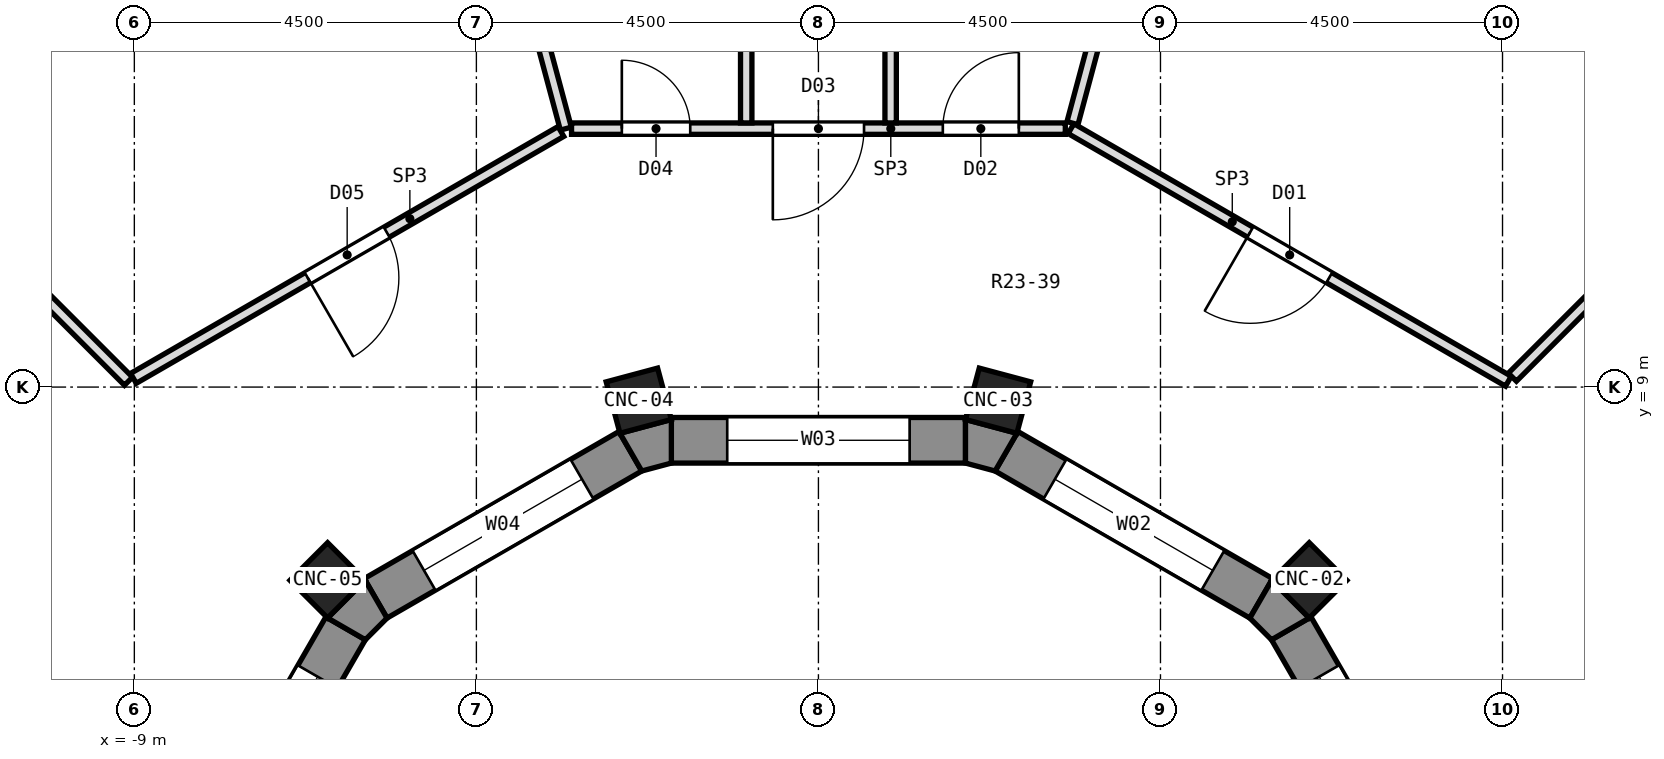
"""IFC4 building model, lengths in metres.
Left out: names, types, materials, properties, quantities, classifications, styles, units other than length and angle.
Written with IfcOpenShell. Run it as: python <this file> out.ifc"""

import sys

from ifc_helpers import new_model, si_unit, direction, frame, frame_2d, origin, origin_2d, place, context, subcontext, project, spatial, polyline, rectangle, outline, extrude, element, fill, save


model = new_model("IFC4")
c1 = context("Model", 3, precision=1e-05, world=origin(), true_north=direction((0.0, 1.0)))
c2 = subcontext(c1, "Body", "Model", "MODEL_VIEW")
j1 = project(units=[si_unit("LENGTHUNIT", "METRE"), si_unit("PLANEANGLEUNIT", "RADIAN")], contexts=[c1])
p1 = place(None, origin())
s1 = spatial("IfcSite", under=j1, at=p1, CompositionType="ELEMENT")
p2 = place(p1, origin())
s2 = spatial("IfcBuilding", under=s1, at=p2, CompositionType="ELEMENT")
p3 = place(p2, frame((0.0, 0.0, 151.3)))
s3 = spatial("IfcBuildingStorey", under=s2, at=p3, CompositionType="ELEMENT", Elevation=151.3)
for number, where, z_axis, x_axis in (
    (1, (6.458, 6.458, 0.0), (0.0, 0.0, 1.0), (0.707, 0.707, 0.0)),
    (2, (2.364, 8.821, 0.0), (0.0, 0.0, 1.0), (0.259, 0.966, 0.0)),
    (3, (-2.364, 8.821, 0.0), (0.0, 0.0, 1.0), (-0.259, 0.966, 0.0)),
    (4, (-6.458, 6.458, 0.0), (0.0, 0.0, 1.0), (-0.707, 0.707, 0.0)),
):
    element("IfcColumn", number, at=place(p3, frame(where, z_axis=z_axis, x_axis=x_axis)), inside=s3, PredefinedType="COLUMN", context=c2, shape_type="SweptSolid", body=[
        extrude(rectangle(XDim=0.7, YDim=0.7, at=origin_2d()), origin(), (0.0, 0.0, 1.0), 4.5),
    ])
p4 = place(p3, frame((8.156, 2.474, 0.0), z_axis=(0.0, 0.0, 1.0), x_axis=(-0.500033728941, 0.866005929495, 0.0)))
e5 = element("IfcWall", 5, at=p4, inside=s3, PredefinedType="SOLIDWALL", context=c2, shape_type="SweptSolid", body=[
    extrude(rectangle(XDim=3.87, YDim=0.6, at=frame_2d((1.935, 0.0))), origin(), (0.0, 0.0, 1.0), 3.95),
])
p5 = place(p4, frame((0.735, 0.0, 1.5)))
e6 = element("IfcOpeningElement", 6, at=p5, cuts=e5, PredefinedType="OPENING", context=c2, shape_type="SweptSolid", body=[
    extrude(rectangle(XDim=2.4, YDim=2.0, at=frame_2d((1.2, 1.0))), frame((0.0, 0.312, 0.0), z_axis=(0.0, -1.0, 0.0), x_axis=(1.0, 0.0, 0.0)), (0.0, 0.0, 1.0), 0.624),
])
p6 = place(p3, frame((5.826, 6.22, 0.0), z_axis=(0.0, 0.0, 1.0), x_axis=(-0.866005929495, 0.500033728941, 0.0)))
e7 = element("IfcWall", 7, at=p6, inside=s3, PredefinedType="SOLIDWALL", context=c2, shape_type="SweptSolid", body=[
    extrude(rectangle(XDim=3.87, YDim=0.6, at=frame_2d((1.935, 0.0))), origin(), (0.0, 0.0, 1.0), 3.95),
])
p7 = place(p6, frame((0.735, 0.0, 1.5)))
e8 = element("IfcOpeningElement", 8, at=p7, cuts=e7, PredefinedType="OPENING", context=c2, shape_type="SweptSolid", body=[
    extrude(rectangle(XDim=2.4, YDim=2.0, at=frame_2d((1.2, 1.0))), frame((0.0, 0.312, 0.0), z_axis=(0.0, -1.0, 0.0), x_axis=(1.0, 0.0, 0.0)), (0.0, 0.0, 1.0), 0.624),
])
p8 = place(p3, frame((1.935, 8.3, 0.0), z_axis=(0.0, 0.0, 1.0), x_axis=(-1.0, 0.0, 0.0)))
e9 = element("IfcWall", 9, at=p8, inside=s3, PredefinedType="SOLIDWALL", context=c2, shape_type="SweptSolid", body=[
    extrude(rectangle(XDim=3.87, YDim=0.6, at=frame_2d((1.935, 0.0))), origin(), (0.0, 0.0, 1.0), 3.95),
])
p9 = place(p8, frame((0.735, 0.0, 1.5)))
e10 = element("IfcOpeningElement", 10, at=p9, cuts=e9, PredefinedType="OPENING", context=c2, shape_type="SweptSolid", body=[
    extrude(rectangle(XDim=2.4, YDim=2.0, at=frame_2d((1.2, 1.0))), frame((0.0, 0.312, 0.0), z_axis=(0.0, -1.0, 0.0), x_axis=(1.0, 0.0, 0.0)), (0.0, 0.0, 1.0), 0.624),
])
p10 = place(p3, frame((-2.474, 8.156, 0.0), z_axis=(0.0, 0.0, 1.0), x_axis=(-0.866005929495, -0.500033728941, 0.0)))
e11 = element("IfcWall", 11, at=p10, inside=s3, PredefinedType="SOLIDWALL", context=c2, shape_type="SweptSolid", body=[
    extrude(rectangle(XDim=3.87, YDim=0.6, at=frame_2d((1.935, 0.0))), origin(), (0.0, 0.0, 1.0), 3.95),
])
p11 = place(p10, frame((0.735, 0.0, 1.5)))
e12 = element("IfcOpeningElement", 12, at=p11, cuts=e11, PredefinedType="OPENING", context=c2, shape_type="SweptSolid", body=[
    extrude(rectangle(XDim=2.4, YDim=2.0, at=frame_2d((1.2, 1.0))), frame((0.0, 0.312, 0.0), z_axis=(0.0, -1.0, 0.0), x_axis=(1.0, 0.0, 0.0)), (0.0, 0.0, 1.0), 0.624),
])
p12 = place(p3, frame((-6.22, 5.826, 0.0), z_axis=(0.0, 0.0, 1.0), x_axis=(-0.500033728941, -0.866005929495, 0.0)))
e13 = element("IfcWall", 13, at=p12, inside=s3, PredefinedType="SOLIDWALL", context=c2, shape_type="SweptSolid", body=[
    extrude(rectangle(XDim=3.87, YDim=0.6, at=frame_2d((1.935, 0.0))), origin(), (0.0, 0.0, 1.0), 3.95),
])
p13 = place(p12, frame((0.735, 0.0, 1.5)))
e14 = element("IfcOpeningElement", 14, at=p13, cuts=e13, PredefinedType="OPENING", context=c2, shape_type="SweptSolid", body=[
    extrude(rectangle(XDim=2.4, YDim=2.0, at=frame_2d((1.2, 1.0))), frame((0.0, 0.312, 0.0), z_axis=(0.0, -1.0, 0.0), x_axis=(1.0, 0.0, 0.0)), (0.0, 0.0, 1.0), 0.624),
])
p14 = place(p3, origin())
e15 = element("IfcWall", 15, at=p14, inside=s3, PredefinedType="SOLIDWALL", context=c2, shape_type="SweptSolid", body=[
    extrude(outline(polyline([(5.962, 6.458), (5.676, 5.961), (5.961, 5.676), (6.458, 5.962), (5.962, 6.458)])), origin(), (0.0, 0.0, 1.0), 3.95),
])
p15 = place(p3, origin())
e16 = element("IfcWall", 16, at=p15, inside=s3, PredefinedType="SOLIDWALL", context=c2, shape_type="SweptSolid", body=[
    extrude(outline(polyline([(1.935, 8.573), (1.935, 8.0), (2.324, 7.896), (2.611, 8.392), (1.935, 8.573)])), origin(), (0.0, 0.0, 1.0), 3.95),
])
p16 = place(p3, origin())
e17 = element("IfcWall", 17, at=p16, inside=s3, PredefinedType="SOLIDWALL", context=c2, shape_type="SweptSolid", body=[
    extrude(outline(polyline([(-1.935, 8.0), (-1.935, 8.573), (-2.611, 8.392), (-2.324, 7.896), (-1.935, 8.0)])), origin(), (0.0, 0.0, 1.0), 3.95),
])
p17 = place(p3, origin())
e18 = element("IfcWall", 18, at=p17, inside=s3, PredefinedType="SOLIDWALL", context=c2, shape_type="SweptSolid", body=[
    extrude(outline(polyline([(-6.458, 5.962), (-5.961, 5.676), (-5.676, 5.961), (-5.962, 6.458), (-6.458, 5.962)])), origin(), (0.0, 0.0, 1.0), 3.95),
])
p18 = place(p3, frame((-6.134, 22.892, 0.0), z_axis=(0.0, 0.0, 1.0), x_axis=(0.258769040429, -0.965939223614, 0.0)))
e19 = element("IfcWall", 19, at=p18, inside=s3, PredefinedType="PARTITIONING", context=c2, shape_type="SweptSolid", body=[
    extrude(rectangle(XDim=10.862, YDim=0.15, at=frame_2d((5.431, 0.0))), origin(), (0.0, 0.0, 1.0), 3.95),
])
p19 = place(p3, frame((-13.15, 13.15, 0.0), z_axis=(0.0, 0.0, 1.0), x_axis=(0.707106781187, -0.707106781187, 0.0)))
e20 = element("IfcWall", 20, at=p19, inside=s3, PredefinedType="PARTITIONING", context=c2, shape_type="SweptSolid", body=[
    extrude(rectangle(XDim=5.76, YDim=0.15, at=frame_2d((2.88, 0.0))), origin(), (0.0, 0.0, 1.0), 3.95),
])
p20 = place(p3, frame((3.323, 12.4, 0.0), z_axis=(0.0, 0.0, 1.0), x_axis=(0.865961614908, -0.500110469302, 0.0)))
e21 = element("IfcWall", 21, at=p20, inside=s3, PredefinedType="PARTITIONING", context=c2, shape_type="SweptSolid", body=[
    extrude(rectangle(XDim=6.645, YDim=0.15, at=frame_2d((3.322, 0.0))), origin(), (0.0, 0.0, 1.0), 3.95),
])
p21 = place(p20, frame((2.722, 0.0, 0.0)))
e22 = element("IfcOpeningElement", 22, at=p21, cuts=e21, PredefinedType="OPENING", context=c2, shape_type="SweptSolid", body=[
    extrude(rectangle(XDim=1.2, YDim=2.1, at=frame_2d((0.6, 1.05))), frame((0.0, 0.087, 0.0), z_axis=(0.0, -1.0, 0.0), x_axis=(1.0, 0.0, 0.0)), (0.0, 0.0, 1.0), 0.174),
])
p22 = place(p3, frame((-3.248, 12.4, 0.0), z_axis=(0.0, 0.0, 1.0), x_axis=(1.0, 0.0, 0.0)))
e23 = element("IfcWall", 23, at=p22, inside=s3, PredefinedType="PARTITIONING", context=c2, shape_type="SweptSolid", body=[
    extrude(rectangle(XDim=6.496, YDim=0.15, at=frame_2d((3.248, 0.0))), origin(), (0.0, 0.0, 1.0), 3.95),
])
p23 = place(p22, frame((4.885, 0.0, 0.0)))
e24 = element("IfcOpeningElement", 24, at=p23, cuts=e23, PredefinedType="OPENING", context=c2, shape_type="SweptSolid", body=[
    extrude(rectangle(XDim=1.0, YDim=2.1, at=frame_2d((0.5, 1.05))), frame((0.0, 0.087, 0.0), z_axis=(0.0, -1.0, 0.0), x_axis=(1.0, 0.0, 0.0)), (0.0, 0.0, 1.0), 0.174),
])
p24 = place(p22, frame((2.648, 0.0, 0.0)))
e25 = element("IfcOpeningElement", 25, at=p24, cuts=e23, PredefinedType="OPENING", context=c2, shape_type="SweptSolid", body=[
    extrude(rectangle(XDim=1.2, YDim=2.1, at=frame_2d((0.6, 1.05))), frame((0.0, 0.087, 0.0), z_axis=(0.0, -1.0, 0.0), x_axis=(1.0, 0.0, 0.0)), (0.0, 0.0, 1.0), 0.174),
])
p25 = place(p22, frame((0.662, 0.0, 0.0)))
e26 = element("IfcOpeningElement", 26, at=p25, cuts=e23, PredefinedType="OPENING", context=c2, shape_type="SweptSolid", body=[
    extrude(rectangle(XDim=0.9, YDim=2.1, at=frame_2d((0.45, 1.05))), frame((0.0, 0.087, 0.0), z_axis=(0.0, -1.0, 0.0), x_axis=(1.0, 0.0, 0.0)), (0.0, 0.0, 1.0), 0.174),
])
p26 = place(p3, frame((-9.012, 9.115, 0.0), z_axis=(0.0, 0.0, 1.0), x_axis=(0.865967095912, 0.5001009786, 0.0)))
e27 = element("IfcWall", 27, at=p26, inside=s3, PredefinedType="PARTITIONING", context=c2, shape_type="SweptSolid", body=[
    extrude(rectangle(XDim=6.495, YDim=0.15, at=frame_2d((3.248, 0.0))), origin(), (0.0, 0.0, 1.0), 3.95),
])
p27 = place(p26, frame((2.647, 0.0, 0.0)))
e28 = element("IfcOpeningElement", 28, at=p27, cuts=e27, PredefinedType="OPENING", context=c2, shape_type="SweptSolid", body=[
    extrude(rectangle(XDim=1.2, YDim=2.1, at=frame_2d((0.6, 1.05))), frame((0.0, 0.087, 0.0), z_axis=(0.0, -1.0, 0.0), x_axis=(1.0, 0.0, 0.0)), (0.0, 0.0, 1.0), 0.174),
])
p28 = place(p3, frame((9.13, 9.13, 0.0), z_axis=(0.0, 0.0, 1.0), x_axis=(0.707106781187, 0.707106781187, 0.0)))
e29 = element("IfcWall", 29, at=p28, inside=s3, PredefinedType="PARTITIONING", context=c2, shape_type="SweptSolid", body=[
    extrude(rectangle(XDim=5.645, YDim=0.15, at=frame_2d((2.823, 0.0))), origin(), (0.0, 0.0, 1.0), 3.95),
])
p29 = place(p3, frame((3.342, 12.472, 0.0), z_axis=(0.0, 0.0, 1.0), x_axis=(0.258802076295, 0.965930372908, 0.0)))
e30 = element("IfcWall", 30, at=p29, inside=s3, PredefinedType="PARTITIONING", context=c2, shape_type="SweptSolid", body=[
    extrude(rectangle(XDim=10.787, YDim=0.15, at=frame_2d((5.394, 0.0))), origin(), (0.0, 0.0, 1.0), 3.95),
])
for number, where, z_axis, x_axis in (
    (31, (0.95, 12.475, 0.0), (0.0, 0.0, 1.0), (0.0, 1.0, 0.0)),
    (32, (-0.95, 12.475, 0.0), (0.0, 0.0, 1.0), (0.0, 1.0, 0.0)),
):
    element("IfcWall", number, at=place(p3, frame(where, z_axis=z_axis, x_axis=x_axis)), inside=s3, PredefinedType="PARTITIONING", context=c2, shape_type="SweptSolid", body=[
        extrude(rectangle(XDim=5.255, YDim=0.15, at=frame_2d((2.627, 0.0))), origin(), (0.0, 0.0, 1.0), 3.95),
    ])
p30 = place(p5, origin())
e33 = element("IfcWindow", 33, at=p30, inside=s3, PartitioningType="SINGLE_PANEL", PredefinedType="WINDOW", context=c2, shape_type="SweptSolid", body=[
    extrude(rectangle(XDim=2.4, YDim=2.0, at=frame_2d((1.2, 1.0))), frame((0.0, -0.12, 0.0), z_axis=(0.0, -1.0, 0.0), x_axis=(1.0, 0.0, 0.0)), (0.0, 0.0, 1.0), 0.06),
])
fill(e6, e33)
p31 = place(p7, origin())
e34 = element("IfcWindow", 34, at=p31, inside=s3, PartitioningType="SINGLE_PANEL", PredefinedType="WINDOW", context=c2, shape_type="SweptSolid", body=[
    extrude(rectangle(XDim=2.4, YDim=2.0, at=frame_2d((1.2, 1.0))), frame((0.0, -0.12, 0.0), z_axis=(0.0, -1.0, 0.0), x_axis=(1.0, 0.0, 0.0)), (0.0, 0.0, 1.0), 0.06),
])
fill(e8, e34)
p32 = place(p9, origin())
e35 = element("IfcWindow", 35, at=p32, inside=s3, PartitioningType="SINGLE_PANEL", PredefinedType="WINDOW", context=c2, shape_type="SweptSolid", body=[
    extrude(rectangle(XDim=2.4, YDim=2.0, at=frame_2d((1.2, 1.0))), frame((0.0, -0.12, 0.0), z_axis=(0.0, -1.0, 0.0), x_axis=(1.0, 0.0, 0.0)), (0.0, 0.0, 1.0), 0.06),
])
fill(e10, e35)
p33 = place(p11, origin())
e36 = element("IfcWindow", 36, at=p33, inside=s3, PartitioningType="SINGLE_PANEL", PredefinedType="WINDOW", context=c2, shape_type="SweptSolid", body=[
    extrude(rectangle(XDim=2.4, YDim=2.0, at=frame_2d((1.2, 1.0))), frame((0.0, -0.12, 0.0), z_axis=(0.0, -1.0, 0.0), x_axis=(1.0, 0.0, 0.0)), (0.0, 0.0, 1.0), 0.06),
])
fill(e12, e36)
p34 = place(p13, origin())
e37 = element("IfcWindow", 37, at=p34, inside=s3, PartitioningType="SINGLE_PANEL", PredefinedType="WINDOW", context=c2, shape_type="SweptSolid", body=[
    extrude(rectangle(XDim=2.4, YDim=2.0, at=frame_2d((1.2, 1.0))), frame((0.0, -0.12, 0.0), z_axis=(0.0, -1.0, 0.0), x_axis=(1.0, 0.0, 0.0)), (0.0, 0.0, 1.0), 0.06),
])
fill(e14, e37)
p35 = place(p21, frame((1.2, 0.0, 0.0), z_axis=(0.0, 0.0, 1.0), x_axis=(-1.0, 0.0, 0.0)))
e38 = element("IfcDoor", 38, at=p35, inside=s3, OperationType="SINGLE_SWING_RIGHT", PredefinedType="DOOR", context=c2, shape_type="SweptSolid", body=[
    extrude(rectangle(XDim=1.2, YDim=2.1, at=frame_2d((0.6, 1.05))), frame((0.0, 0.025, 0.0), z_axis=(0.0, -1.0, 0.0), x_axis=(1.0, 0.0, 0.0)), (0.0, 0.0, 1.0), 0.05),
])
fill(e22, e38)
p36 = place(p23, origin())
e39 = element("IfcDoor", 39, at=p36, inside=s3, OperationType="SINGLE_SWING_RIGHT", PredefinedType="DOOR", context=c2, shape_type="SweptSolid", body=[
    extrude(rectangle(XDim=1.0, YDim=2.1, at=frame_2d((0.5, 1.05))), frame((0.0, 0.025, 0.0), z_axis=(0.0, -1.0, 0.0), x_axis=(1.0, 0.0, 0.0)), (0.0, 0.0, 1.0), 0.05),
])
fill(e24, e39)
p37 = place(p24, frame((1.2, 0.0, 0.0), z_axis=(0.0, 0.0, 1.0), x_axis=(-1.0, 0.0, 0.0)))
e40 = element("IfcDoor", 40, at=p37, inside=s3, OperationType="SINGLE_SWING_RIGHT", PredefinedType="DOOR", context=c2, shape_type="SweptSolid", body=[
    extrude(rectangle(XDim=1.2, YDim=2.1, at=frame_2d((0.6, 1.05))), frame((0.0, 0.025, 0.0), z_axis=(0.0, -1.0, 0.0), x_axis=(1.0, 0.0, 0.0)), (0.0, 0.0, 1.0), 0.05),
])
fill(e25, e40)
p38 = place(p25, origin())
e41 = element("IfcDoor", 41, at=p38, inside=s3, OperationType="SINGLE_SWING_LEFT", PredefinedType="DOOR", context=c2, shape_type="SweptSolid", body=[
    extrude(rectangle(XDim=0.9, YDim=2.1, at=frame_2d((0.45, 1.05))), frame((0.0, 0.025, 0.0), z_axis=(0.0, -1.0, 0.0), x_axis=(1.0, 0.0, 0.0)), (0.0, 0.0, 1.0), 0.05),
])
fill(e26, e41)
p39 = place(p27, frame((1.2, 0.0, 0.0), z_axis=(0.0, 0.0, 1.0), x_axis=(-1.0, 0.0, 0.0)))
e42 = element("IfcDoor", 42, at=p39, inside=s3, OperationType="SINGLE_SWING_RIGHT", PredefinedType="DOOR", context=c2, shape_type="SweptSolid", body=[
    extrude(rectangle(XDim=1.2, YDim=2.1, at=frame_2d((0.6, 1.05))), frame((0.0, 0.025, 0.0), z_axis=(0.0, -1.0, 0.0), x_axis=(1.0, 0.0, 0.0)), (0.0, 0.0, 1.0), 0.05),
])
fill(e28, e42)
save(model, sys.argv[1])
